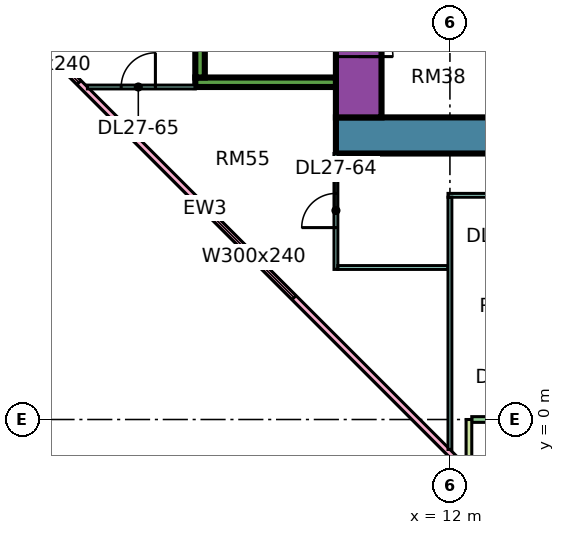
"""IFC4 building model, lengths in metres.
Left out: names, types, materials, properties, quantities, classifications, styles, units other than length and angle.
Written with IfcOpenShell. Run it as: python <this file> out.ifc"""

import sys

from ifc_helpers import new_model, si_unit, direction, frame, frame_2d, origin, place, context, subcontext, project, spatial, rectangle, extrude, element, fill, save


model = new_model("IFC4")
c1 = context("Model", 3, precision=1e-05, world=origin(), true_north=direction((0.0, 1.0)))
c2 = subcontext(c1, "Body", "Model", "MODEL_VIEW")
j1 = project(units=[si_unit("LENGTHUNIT", "METRE"), si_unit("PLANEANGLEUNIT", "RADIAN")], contexts=[c1])
p1 = place(None, origin())
s1 = spatial("IfcSite", under=j1, at=p1, CompositionType="ELEMENT")
p2 = place(p1, origin())
s2 = spatial("IfcBuilding", under=s1, at=p2, CompositionType="ELEMENT")
p3 = place(p2, frame((0.0, 0.0, 118.15)))
s3 = spatial("IfcBuildingStorey", under=s2, at=p3, CompositionType="ELEMENT", Elevation=118.15)
p4 = place(p3, frame((9.0, 7.475, 0.0), z_axis=(0.0, 0.0, 1.0), x_axis=(1.0, 0.0, 0.0)))
e1 = element("IfcWall", 1, at=p4, inside=s3, PredefinedType="SHEAR", context=c2, shape_type="SweptSolid", body=[
    extrude(rectangle(XDim=25.0, YDim=0.95, at=frame_2d((12.5, 0.0))), origin(), (0.0, 0.0, 1.0), 3.75),
])
p5 = place(p3, frame((9.6, 7.95, 0.0), z_axis=(0.0, 0.0, 1.0), x_axis=(0.0, 1.0, 0.0)))
e2 = element("IfcWall", 2, at=p5, inside=s3, PredefinedType="SHEAR", context=c2, shape_type="SweptSolid", body=[
    extrude(rectangle(XDim=11.1, YDim=1.2, at=frame_2d((5.55, 0.0))), origin(), (0.0, 0.0, 1.0), 3.75),
])
p6 = place(p5, frame((3.925, 0.0, 0.0)))
e3 = element("IfcOpeningElement", 3, at=p6, cuts=e2, PredefinedType="OPENING", context=c2, shape_type="SweptSolid", body=[
    extrude(rectangle(XDim=1.1, YDim=2.2, at=frame_2d((0.55, 1.1))), frame((0.0, 0.61, 0.0), z_axis=(0.0, -1.0, 0.0), x_axis=(1.0, 0.0, 0.0)), (0.0, 0.0, 1.0), 1.22),
])
p7 = place(p5, frame((6.425, 0.0, 0.0)))
e4 = element("IfcOpeningElement", 4, at=p7, cuts=e2, PredefinedType="OPENING", context=c2, shape_type="SweptSolid", body=[
    extrude(rectangle(XDim=1.1, YDim=2.2, at=frame_2d((0.55, 1.1))), frame((0.0, 0.61, 0.0), z_axis=(0.0, -1.0, 0.0), x_axis=(1.0, 0.0, 0.0)), (0.0, 0.0, 1.0), 1.22),
])
p8 = place(p5, frame((9.175, 0.0, 0.0)))
e5 = element("IfcOpeningElement", 5, at=p8, cuts=e2, PredefinedType="OPENING", context=c2, shape_type="SweptSolid", body=[
    extrude(rectangle(XDim=1.1, YDim=2.2, at=frame_2d((0.55, 1.1))), frame((0.0, 0.61, 0.0), z_axis=(0.0, -1.0, 0.0), x_axis=(1.0, 0.0, 0.0)), (0.0, 0.0, 1.0), 1.22),
])
p9 = place(p5, frame((1.6, 0.0, 0.0)))
e6 = element("IfcOpeningElement", 6, at=p9, cuts=e2, PredefinedType="OPENING", context=c2, shape_type="SweptSolid", body=[
    extrude(rectangle(XDim=0.9, YDim=2.1, at=frame_2d((0.45, 1.05))), frame((0.0, 0.61, 0.0), z_axis=(0.0, -1.0, 0.0), x_axis=(1.0, 0.0, 0.0)), (0.0, 0.0, 1.0), 1.22),
])
p10 = place(p3, frame((5.3, 8.875, 0.0), z_axis=(0.0, 0.0, 1.0), x_axis=(1.0, 0.0, 0.0)))
e7 = element("IfcWall", 7, at=p10, inside=s3, PredefinedType="SHEAR", context=c2, shape_type="SweptSolid", body=[
    extrude(rectangle(XDim=3.7, YDim=0.25, at=frame_2d((1.85, 0.0))), origin(), (0.0, 0.0, 1.0), 3.75),
])
p11 = place(p3, frame((5.425, 9.0, 0.0), z_axis=(0.0, 0.0, 1.0), x_axis=(0.0, 1.0, 0.0)))
e8 = element("IfcWall", 8, at=p11, inside=s3, PredefinedType="SHEAR", context=c2, shape_type="SweptSolid", body=[
    extrude(rectangle(XDim=4.0, YDim=0.25, at=frame_2d((2.0, 0.0))), origin(), (0.0, 0.0, 1.0), 3.75),
])
p12 = place(p3, frame((-1.447, 12.553, 0.0), z_axis=(0.0, 0.0, 1.0), x_axis=(0.707106781187, -0.707106781187, 0.0)))
e9 = element("IfcWall", 9, at=p12, inside=s3, PredefinedType="SOLIDWALL", context=c2, shape_type="SweptSolid", body=[
    extrude(rectangle(XDim=19.799, YDim=0.15, at=frame_2d((9.899, 0.0))), origin(), (0.0, 0.0, 1.0), 3.35),
])
p13 = place(p12, frame((2.212, 0.0, 0.45)))
e10 = element("IfcOpeningElement", 10, at=p13, cuts=e9, PredefinedType="OPENING", context=c2, shape_type="SweptSolid", body=[
    extrude(rectangle(XDim=3.0, YDim=2.4, at=frame_2d((1.5, 1.2))), frame((0.0, 0.085, 0.0), z_axis=(0.0, -1.0, 0.0), x_axis=(1.0, 0.0, 0.0)), (0.0, 0.0, 1.0), 0.17),
])
p14 = place(p12, frame((10.216, 0.0, 0.45)))
e11 = element("IfcOpeningElement", 11, at=p14, cuts=e9, PredefinedType="OPENING", context=c2, shape_type="SweptSolid", body=[
    extrude(rectangle(XDim=3.0, YDim=2.4, at=frame_2d((1.5, 1.2))), frame((0.0, 0.085, 0.0), z_axis=(0.0, -1.0, 0.0), x_axis=(1.0, 0.0, 0.0)), (0.0, 0.0, 1.0), 0.17),
])
p15 = place(p3, frame((12.575, 0.0, 0.0), z_axis=(0.0, 0.0, 1.0), x_axis=(1.0, 0.0, 0.0)))
e12 = element("IfcWall", 12, at=p15, inside=s3, PredefinedType="SOLIDWALL", context=c2, shape_type="SweptSolid", body=[
    extrude(rectangle(XDim=11.35, YDim=0.15, at=frame_2d((5.675, 0.0))), origin(), (0.0, 0.0, 1.0), 3.35),
])
p16 = place(p15, frame((0.613, 0.0, 0.0)))
e13 = element("IfcOpeningElement", 13, at=p16, cuts=e12, PredefinedType="OPENING", context=c2, shape_type="SweptSolid", body=[
    extrude(rectangle(XDim=1.2, YDim=2.4, at=frame_2d((0.6, 1.2))), frame((0.0, 0.085, 0.0), z_axis=(0.0, -1.0, 0.0), x_axis=(1.0, 0.0, 0.0)), (0.0, 0.0, 1.0), 0.17),
])
p17 = place(p15, frame((3.025, 0.0, 0.45)))
e14 = element("IfcOpeningElement", 14, at=p17, cuts=e12, PredefinedType="OPENING", context=c2, shape_type="SweptSolid", body=[
    extrude(rectangle(XDim=1.8, YDim=2.4, at=frame_2d((0.9, 1.2))), frame((0.0, 0.085, 0.0), z_axis=(0.0, -1.0, 0.0), x_axis=(1.0, 0.0, 0.0)), (0.0, 0.0, 1.0), 0.17),
])
p18 = place(p15, frame((6.025, 0.0, 0.45)))
e15 = element("IfcOpeningElement", 15, at=p18, cuts=e12, PredefinedType="OPENING", context=c2, shape_type="SweptSolid", body=[
    extrude(rectangle(XDim=1.8, YDim=2.4, at=frame_2d((0.9, 1.2))), frame((0.0, 0.085, 0.0), z_axis=(0.0, -1.0, 0.0), x_axis=(1.0, 0.0, 0.0)), (0.0, 0.0, 1.0), 0.17),
])
p19 = place(p15, frame((9.025, 0.0, 0.45)))
e16 = element("IfcOpeningElement", 16, at=p19, cuts=e12, PredefinedType="OPENING", context=c2, shape_type="SweptSolid", body=[
    extrude(rectangle(XDim=1.2, YDim=2.4, at=frame_2d((0.6, 1.2))), frame((0.0, 0.085, 0.0), z_axis=(0.0, -1.0, 0.0), x_axis=(1.0, 0.0, 0.0)), (0.0, 0.0, 1.0), 0.17),
])
p20 = place(p3, frame((12.5, -1.5, 0.0), z_axis=(0.0, 0.0, 1.0), x_axis=(0.0, 1.0, 0.0)))
e17 = element("IfcWall", 17, at=p20, inside=s3, PredefinedType="SOLIDWALL", context=c2, shape_type="SweptSolid", body=[
    extrude(rectangle(XDim=1.5, YDim=0.15, at=frame_2d((0.75, 0.0))), origin(), (0.0, 0.0, 1.0), 3.35),
])
p21 = place(p3, frame((2.461, 8.75, 0.0), z_axis=(0.0, 0.0, 1.0), x_axis=(1.0, 0.0, 0.0)))
e18 = element("IfcWall", 18, at=p21, inside=s3, PredefinedType="PARTITIONING", context=c2, shape_type="SweptSolid", body=[
    extrude(rectangle(XDim=2.839, YDim=0.1, at=frame_2d((1.419, 0.0))), origin(), (0.0, 0.0, 1.0), 3.35),
])
p22 = place(p21, frame((0.889, 0.0, 0.0)))
e19 = element("IfcOpeningElement", 19, at=p22, cuts=e18, PredefinedType="OPENING", context=c2, shape_type="SweptSolid", body=[
    extrude(rectangle(XDim=0.9, YDim=2.1, at=frame_2d((0.45, 1.05))), frame((0.0, 0.06, 0.0), z_axis=(0.0, -1.0, 0.0), x_axis=(1.0, 0.0, 0.0)), (0.0, 0.0, 1.0), 0.12),
])
p23 = place(p3, frame((9.0, 3.95, 0.0), z_axis=(0.0, 0.0, 1.0), x_axis=(0.0, 1.0, 0.0)))
e20 = element("IfcWall", 20, at=p23, inside=s3, PredefinedType="PARTITIONING", context=c2, shape_type="SweptSolid", body=[
    extrude(rectangle(XDim=3.05, YDim=0.1, at=frame_2d((1.525, 0.0))), origin(), (0.0, 0.0, 1.0), 3.35),
])
p24 = place(p23, frame((1.1, 0.0, 0.0)))
e21 = element("IfcOpeningElement", 21, at=p24, cuts=e20, PredefinedType="OPENING", context=c2, shape_type="SweptSolid", body=[
    extrude(rectangle(XDim=0.9, YDim=2.1, at=frame_2d((0.45, 1.05))), frame((0.0, 0.06, 0.0), z_axis=(0.0, -1.0, 0.0), x_axis=(1.0, 0.0, 0.0)), (0.0, 0.0, 1.0), 0.12),
])
p25 = place(p3, frame((9.05, 4.0, 0.0), z_axis=(0.0, 0.0, 1.0), x_axis=(1.0, 0.0, 0.0)))
e22 = element("IfcWall", 22, at=p25, inside=s3, PredefinedType="PARTITIONING", context=c2, shape_type="SweptSolid", body=[
    extrude(rectangle(XDim=2.9, YDim=0.1, at=frame_2d((1.45, 0.0))), origin(), (0.0, 0.0, 1.0), 3.35),
])
p26 = place(p3, frame((11.95, 5.9, 0.0), z_axis=(0.0, 0.0, 1.0), x_axis=(1.0, 0.0, 0.0)))
e23 = element("IfcWall", 23, at=p26, inside=s3, PredefinedType="PARTITIONING", context=c2, shape_type="SweptSolid", body=[
    extrude(rectangle(XDim=21.1, YDim=0.1, at=frame_2d((10.55, 0.0))), origin(), (0.0, 0.0, 1.0), 3.35),
])
p27 = place(p26, frame((1.1, 0.0, 0.0)))
e24 = element("IfcOpeningElement", 24, at=p27, cuts=e23, PredefinedType="OPENING", context=c2, shape_type="SweptSolid", body=[
    extrude(rectangle(XDim=0.9, YDim=2.1, at=frame_2d((0.45, 1.05))), frame((0.0, 0.06, 0.0), z_axis=(0.0, -1.0, 0.0), x_axis=(1.0, 0.0, 0.0)), (0.0, 0.0, 1.0), 0.12),
])
p28 = place(p26, frame((4.1, 0.0, 0.0)))
e25 = element("IfcOpeningElement", 25, at=p28, cuts=e23, PredefinedType="OPENING", context=c2, shape_type="SweptSolid", body=[
    extrude(rectangle(XDim=0.9, YDim=2.1, at=frame_2d((0.45, 1.05))), frame((0.0, 0.06, 0.0), z_axis=(0.0, -1.0, 0.0), x_axis=(1.0, 0.0, 0.0)), (0.0, 0.0, 1.0), 0.12),
])
p29 = place(p26, frame((7.1, 0.0, 0.0)))
e26 = element("IfcOpeningElement", 26, at=p29, cuts=e23, PredefinedType="OPENING", context=c2, shape_type="SweptSolid", body=[
    extrude(rectangle(XDim=0.9, YDim=2.1, at=frame_2d((0.45, 1.05))), frame((0.0, 0.06, 0.0), z_axis=(0.0, -1.0, 0.0), x_axis=(1.0, 0.0, 0.0)), (0.0, 0.0, 1.0), 0.12),
])
p30 = place(p26, frame((10.1, 0.0, 0.0)))
e27 = element("IfcOpeningElement", 27, at=p30, cuts=e23, PredefinedType="OPENING", context=c2, shape_type="SweptSolid", body=[
    extrude(rectangle(XDim=0.9, YDim=2.1, at=frame_2d((0.45, 1.05))), frame((0.0, 0.06, 0.0), z_axis=(0.0, -1.0, 0.0), x_axis=(1.0, 0.0, 0.0)), (0.0, 0.0, 1.0), 0.12),
])
p31 = place(p26, frame((16.1, 0.0, 0.0)))
e28 = element("IfcOpeningElement", 28, at=p31, cuts=e23, PredefinedType="OPENING", context=c2, shape_type="SweptSolid", body=[
    extrude(rectangle(XDim=0.9, YDim=2.1, at=frame_2d((0.45, 1.05))), frame((0.0, 0.06, 0.0), z_axis=(0.0, -1.0, 0.0), x_axis=(1.0, 0.0, 0.0)), (0.0, 0.0, 1.0), 0.12),
])
p32 = place(p3, frame((12.0, -0.788, 0.0), z_axis=(0.0, 0.0, 1.0), x_axis=(0.0, 1.0, 0.0)))
e29 = element("IfcWall", 29, at=p32, inside=s3, PredefinedType="PARTITIONING", context=c2, shape_type="SweptSolid", body=[
    extrude(rectangle(XDim=6.638, YDim=0.1, at=frame_2d((3.319, 0.0))), origin(), (0.0, 0.0, 1.0), 3.35),
])
p33 = place(p13, origin())
e30 = element("IfcWindow", 30, at=p33, inside=s3, PartitioningType="SINGLE_PANEL", PredefinedType="WINDOW", context=c2, shape_type="SweptSolid", body=[
    extrude(rectangle(XDim=3.0, YDim=2.4, at=frame_2d((1.5, 1.2))), frame((0.0, 0.03, 0.0), z_axis=(0.0, -1.0, 0.0), x_axis=(1.0, 0.0, 0.0)), (0.0, 0.0, 1.0), 0.06),
])
fill(e10, e30)
p34 = place(p14, origin())
e31 = element("IfcWindow", 31, at=p34, inside=s3, PartitioningType="SINGLE_PANEL", PredefinedType="WINDOW", context=c2, shape_type="SweptSolid", body=[
    extrude(rectangle(XDim=3.0, YDim=2.4, at=frame_2d((1.5, 1.2))), frame((0.0, 0.03, 0.0), z_axis=(0.0, -1.0, 0.0), x_axis=(1.0, 0.0, 0.0)), (0.0, 0.0, 1.0), 0.06),
])
fill(e11, e31)
p35 = place(p9, frame((0.9, 0.0, 0.0), z_axis=(0.0, 0.0, 1.0), x_axis=(-1.0, 0.0, 0.0)))
e32 = element("IfcDoor", 32, at=p35, inside=s3, OperationType="SINGLE_SWING_LEFT", PredefinedType="DOOR", context=c2, shape_type="SweptSolid", body=[
    extrude(rectangle(XDim=0.9, YDim=2.1, at=frame_2d((0.45, 1.05))), frame((0.0, 0.025, 0.0), z_axis=(0.0, -1.0, 0.0), x_axis=(1.0, 0.0, 0.0)), (0.0, 0.0, 1.0), 0.05),
])
fill(e6, e32)
p36 = place(p24, origin())
e33 = element("IfcDoor", 33, at=p36, inside=s3, OperationType="SINGLE_SWING_LEFT", PredefinedType="DOOR", context=c2, shape_type="SweptSolid", body=[
    extrude(rectangle(XDim=0.9, YDim=2.1, at=frame_2d((0.45, 1.05))), frame((0.0, 0.025, 0.0), z_axis=(0.0, -1.0, 0.0), x_axis=(1.0, 0.0, 0.0)), (0.0, 0.0, 1.0), 0.05),
])
fill(e21, e33)
p37 = place(p22, frame((0.9, 0.0, 0.0), z_axis=(0.0, 0.0, 1.0), x_axis=(-1.0, 0.0, 0.0)))
e34 = element("IfcDoor", 34, at=p37, inside=s3, OperationType="SINGLE_SWING_RIGHT", PredefinedType="DOOR", context=c2, shape_type="SweptSolid", body=[
    extrude(rectangle(XDim=0.9, YDim=2.1, at=frame_2d((0.45, 1.05))), frame((0.0, 0.025, 0.0), z_axis=(0.0, -1.0, 0.0), x_axis=(1.0, 0.0, 0.0)), (0.0, 0.0, 1.0), 0.05),
])
fill(e19, e34)
save(model, sys.argv[1])
